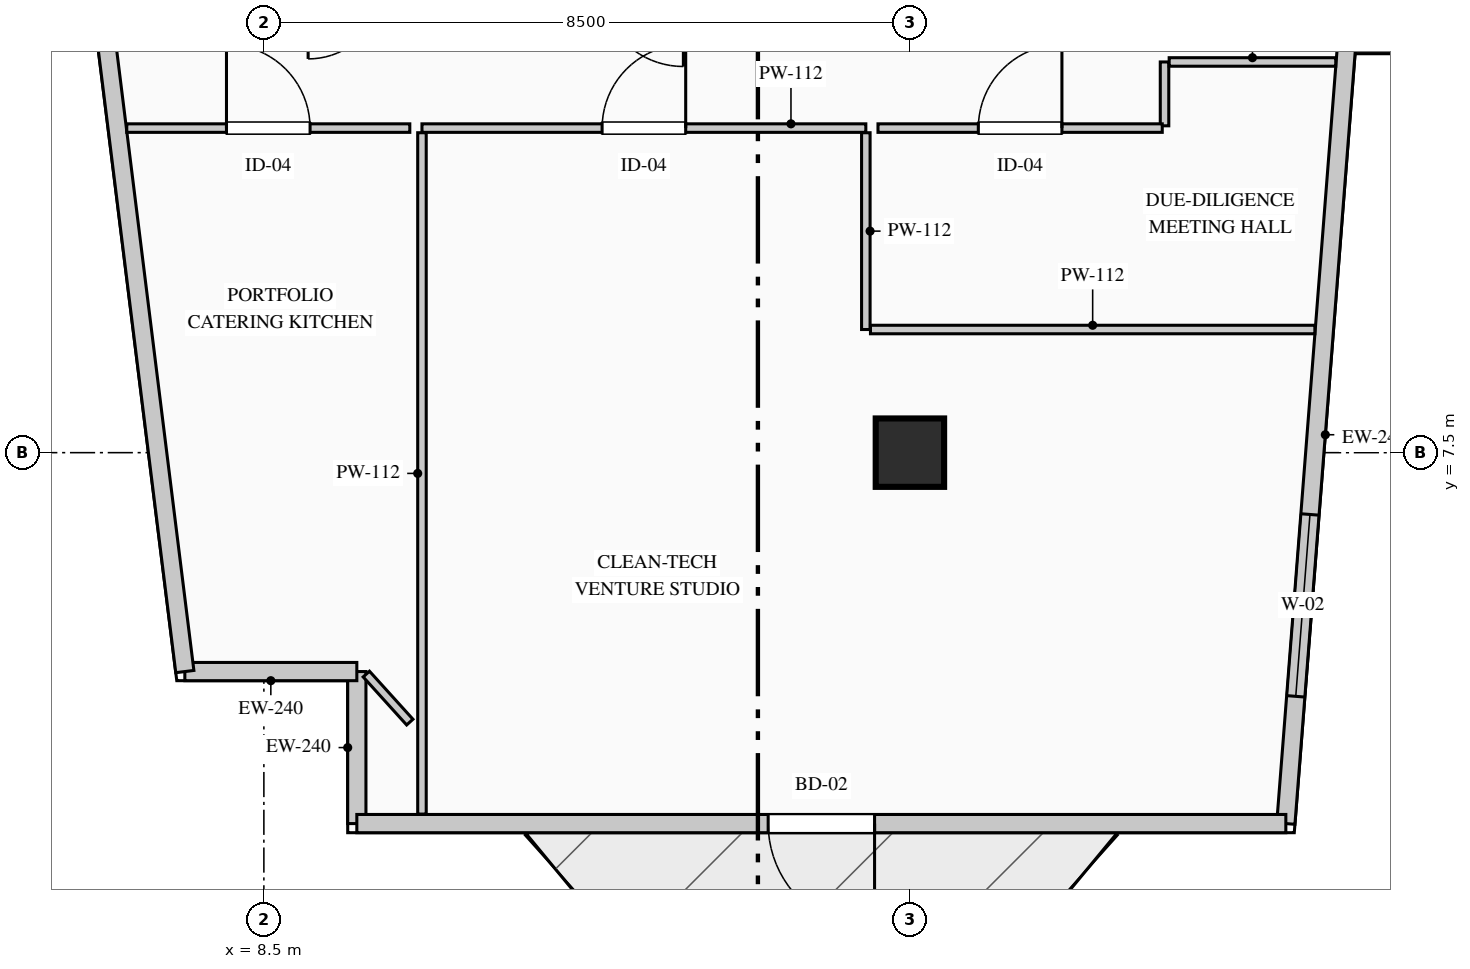
"""IFC4 building model, lengths in metres.
Left out: names, types, materials, properties, quantities, classifications, styles, units other than length and angle.
Written with IfcOpenShell. Run it as: python <this file> out.ifc"""

import sys

from ifc_helpers import new_model, si_unit, direction, frame, frame_2d, origin, origin_2d, place, context, subcontext, project, spatial, rectangle, extrude, element, fill, save


model = new_model("IFC4")
c1 = context("Model", 3, precision=1e-05, world=origin(), true_north=direction((0.0, 1.0)))
c2 = subcontext(c1, "Body", "Model", "MODEL_VIEW")
j1 = project(units=[si_unit("LENGTHUNIT", "METRE"), si_unit("PLANEANGLEUNIT", "RADIAN")], contexts=[c1])
p1 = place(None, origin())
s1 = spatial("IfcSite", under=j1, at=p1, CompositionType="ELEMENT")
p2 = place(p1, origin())
s2 = spatial("IfcBuilding", under=s1, at=p2, CompositionType="ELEMENT")
p3 = place(p2, frame((0.0, 0.0, 227.2)))
s3 = spatial("IfcBuildingStorey", under=s2, at=p3, CompositionType="ELEMENT", Elevation=227.2)
p4 = place(p3, frame((17.0, 7.5, 0.0), z_axis=(0.0, 0.0, 1.0), x_axis=(1.0, 0.0, 0.0)))
e1 = element("IfcColumn", 1, at=p4, inside=s3, PredefinedType="COLUMN", context=c2, shape_type="SweptSolid", body=[
    extrude(rectangle(XDim=0.9, YDim=0.9, at=origin_2d()), origin(), (0.0, 0.0, 1.0), 3.95),
])
p5 = place(p3, frame((9.723, 2.62, 0.0), z_axis=(0.0, 0.0, 1.0), x_axis=(0.0, 1.0, 0.0)))
e2 = element("IfcWall", 2, at=p5, inside=s3, PredefinedType="STANDARD", context=c2, shape_type="SweptSolid", body=[
    extrude(rectangle(XDim=2.0, YDim=0.24, at=frame_2d((1.0, 0.0))), origin(), (0.0, 0.0, 1.0), 3.7),
])
p6 = place(p3, frame((9.723, 4.62, 0.0), z_axis=(0.0, 0.0, 1.0), x_axis=(-1.0, 0.0, 0.0)))
e3 = element("IfcWall", 3, at=p6, inside=s3, PredefinedType="STANDARD", context=c2, shape_type="SweptSolid", body=[
    extrude(rectangle(XDim=2.263, YDim=0.24, at=frame_2d((1.131, 0.0))), origin(), (0.0, 0.0, 1.0), 3.7),
])
p7 = place(p3, frame((7.46, 4.62, 0.0), z_axis=(0.0, 0.0, 1.0), x_axis=(-0.123515576323, 0.992342633573, 0.0)))
e4 = element("IfcWall", 4, at=p7, inside=s3, PredefinedType="STANDARD", context=c2, shape_type="SweptSolid", body=[
    extrude(rectangle(XDim=37.043, YDim=0.24, at=frame_2d((18.522, 0.0))), origin(), (0.0, 0.0, 1.0), 3.7),
])
p8 = place(p7, frame((9.536, 0.0, 0.9)))
e5 = element("IfcOpeningElement", 5, at=p8, cuts=e4, PredefinedType="OPENING", context=c2, shape_type="SweptSolid", body=[
    extrude(rectangle(XDim=2.7, YDim=2.1, at=frame_2d((1.35, 1.05))), frame((0.0, 0.13, 0.0), z_axis=(0.0, -1.0, 0.0), x_axis=(1.0, 0.0, 0.0)), (0.0, 0.0, 1.0), 0.26),
])
p9 = place(p3, frame((29.581, 12.87, 0.0), z_axis=(0.0, 0.0, 1.0), x_axis=(-1.0, 0.0, 0.0)))
e6 = element("IfcWall", 6, at=p9, inside=s3, PredefinedType="STANDARD", context=c2, shape_type="SweptSolid", body=[
    extrude(rectangle(XDim=6.834, YDim=0.24, at=frame_2d((3.417, 0.0))), origin(), (0.0, 0.0, 1.0), 3.7),
])
p10 = place(p9, frame((1.26, 0.0, 0.9)))
e7 = element("IfcOpeningElement", 7, at=p10, cuts=e6, PredefinedType="OPENING", context=c2, shape_type="SweptSolid", body=[
    extrude(rectangle(XDim=2.4, YDim=2.1, at=frame_2d((1.2, 1.05))), frame((0.0, 0.13, 0.0), z_axis=(0.0, -1.0, 0.0), x_axis=(1.0, 0.0, 0.0)), (0.0, 0.0, 1.0), 0.26),
])
p11 = place(p3, frame((22.746, 12.87, 0.0), z_axis=(0.0, 0.0, 1.0), x_axis=(-0.077816860153, -0.996967670627, 0.0)))
e8 = element("IfcWall", 8, at=p11, inside=s3, PredefinedType="STANDARD", context=c2, shape_type="SweptSolid", body=[
    extrude(rectangle(XDim=10.281, YDim=0.24, at=frame_2d((5.141, 0.0))), origin(), (0.0, 0.0, 1.0), 3.7),
])
p12 = place(p11, frame((6.202, 0.0, 0.9)))
e9 = element("IfcOpeningElement", 9, at=p12, cuts=e8, PredefinedType="OPENING", context=c2, shape_type="SweptSolid", body=[
    extrude(rectangle(XDim=2.4, YDim=2.1, at=frame_2d((1.2, 1.05))), frame((0.0, 0.13, 0.0), z_axis=(0.0, -1.0, 0.0), x_axis=(1.0, 0.0, 0.0)), (0.0, 0.0, 1.0), 0.26),
])
p13 = place(p3, frame((21.946, 2.62, 0.0), z_axis=(0.0, 0.0, 1.0), x_axis=(-1.0, 0.0, 0.0)))
e10 = element("IfcWall", 10, at=p13, inside=s3, PredefinedType="STANDARD", context=c2, shape_type="SweptSolid", body=[
    extrude(rectangle(XDim=12.223, YDim=0.24, at=frame_2d((6.112, 0.0))), origin(), (0.0, 0.0, 1.0), 3.7),
])
p14 = place(p13, frame((5.411, 0.0, 0.0)))
e11 = element("IfcOpeningElement", 11, at=p14, cuts=e10, PredefinedType="OPENING", context=c2, shape_type="SweptSolid", body=[
    extrude(rectangle(XDim=1.4, YDim=2.2, at=frame_2d((0.7, 1.1))), frame((0.0, 0.13, 0.0), z_axis=(0.0, -1.0, 0.0), x_axis=(1.0, 0.0, 0.0)), (0.0, 0.0, 1.0), 0.26),
])
p15 = place(p3, frame((10.58, 11.77, 0.0), z_axis=(0.0, 0.0, 1.0), x_axis=(1.0, 0.0, 0.0)))
e12 = element("IfcWall", 12, at=p15, inside=s3, PredefinedType="PARTITIONING", context=c2, shape_type="SweptSolid", body=[
    extrude(rectangle(XDim=5.84, YDim=0.112, at=frame_2d((2.92, 0.0))), origin(), (0.0, 0.0, 1.0), 3.7),
])
p16 = place(p15, frame((2.37, 0.0, 0.0)))
e13 = element("IfcOpeningElement", 13, at=p16, cuts=e12, PredefinedType="OPENING", context=c2, shape_type="SweptSolid", body=[
    extrude(rectangle(XDim=1.1, YDim=2.2, at=frame_2d((0.55, 1.1))), frame((0.0, 0.066, 0.0), z_axis=(0.0, -1.0, 0.0), x_axis=(1.0, 0.0, 0.0)), (0.0, 0.0, 1.0), 0.132),
])
p17 = place(p3, frame((16.42, 11.709, 0.0), z_axis=(0.0, 0.0, 1.0), x_axis=(0.0, -1.0, 0.0)))
e14 = element("IfcWall", 14, at=p17, inside=s3, PredefinedType="PARTITIONING", context=c2, shape_type="SweptSolid", body=[
    extrude(rectangle(XDim=2.589, YDim=0.112, at=frame_2d((1.294, 0.0))), origin(), (0.0, 0.0, 1.0), 3.7),
])
p18 = place(p3, frame((16.481, 9.12, 0.0), z_axis=(0.0, 0.0, 1.0), x_axis=(1.0, 0.0, 0.0)))
e15 = element("IfcWall", 15, at=p18, inside=s3, PredefinedType="PARTITIONING", context=c2, shape_type="SweptSolid", body=[
    extrude(rectangle(XDim=5.847, YDim=0.112, at=frame_2d((2.923, 0.0))), origin(), (0.0, 0.0, 1.0), 3.7),
])
p19 = place(p3, frame((10.58, 2.745, 0.0), z_axis=(0.0, 0.0, 1.0), x_axis=(0.0, 1.0, 0.0)))
e16 = element("IfcWall", 16, at=p19, inside=s3, PredefinedType="PARTITIONING", context=c2, shape_type="SweptSolid", body=[
    extrude(rectangle(XDim=8.964, YDim=0.112, at=frame_2d((4.482, 0.0))), origin(), (0.0, 0.0, 1.0), 3.7),
])
p20 = place(p3, frame((10.42, 3.955, 0.0), z_axis=(0.0, 0.0, 1.0), x_axis=(-0.671145806114, 0.741325371841, 0.0)))
e17 = element("IfcWall", 17, at=p20, inside=s3, PredefinedType="PARTITIONING", context=c2, shape_type="SweptSolid", body=[
    extrude(rectangle(XDim=0.852, YDim=0.112, at=frame_2d((0.426, 0.0))), origin(), (0.0, 0.0, 1.0), 3.7),
])
p21 = place(p3, frame((6.696, 11.77, 0.0), z_axis=(0.0, 0.0, 1.0), x_axis=(1.0, 0.0, 0.0)))
e18 = element("IfcWall", 18, at=p21, inside=s3, PredefinedType="PARTITIONING", context=c2, shape_type="SweptSolid", body=[
    extrude(rectangle(XDim=3.724, YDim=0.112, at=frame_2d((1.862, 0.0))), origin(), (0.0, 0.0, 1.0), 3.7),
])
p22 = place(p21, frame((1.312, 0.0, 0.0)))
e19 = element("IfcOpeningElement", 19, at=p22, cuts=e18, PredefinedType="OPENING", context=c2, shape_type="SweptSolid", body=[
    extrude(rectangle(XDim=1.1, YDim=2.2, at=frame_2d((0.55, 1.1))), frame((0.0, 0.066, 0.0), z_axis=(0.0, -1.0, 0.0), x_axis=(1.0, 0.0, 0.0)), (0.0, 0.0, 1.0), 0.132),
])
p23 = place(p3, frame((20.35, 11.8, 0.0), z_axis=(0.0, 0.0, 1.0), x_axis=(0.0, 1.0, 0.0)))
e20 = element("IfcWall", 20, at=p23, inside=s3, PredefinedType="PARTITIONING", context=c2, shape_type="SweptSolid", body=[
    extrude(rectangle(XDim=0.84, YDim=0.112, at=frame_2d((0.42, 0.0))), origin(), (0.0, 0.0, 1.0), 3.7),
])
p24 = place(p3, frame((20.411, 12.64, 0.0), z_axis=(0.0, 0.0, 1.0), x_axis=(1.0, 0.0, 0.0)))
e21 = element("IfcWall", 21, at=p24, inside=s3, PredefinedType="PARTITIONING", context=c2, shape_type="SweptSolid", body=[
    extrude(rectangle(XDim=2.192, YDim=0.112, at=frame_2d((1.096, 0.0))), origin(), (0.0, 0.0, 1.0), 3.7),
])
p25 = place(p3, frame((16.58, 11.77, 0.0), z_axis=(0.0, 0.0, 1.0), x_axis=(1.0, 0.0, 0.0)))
e22 = element("IfcWall", 22, at=p25, inside=s3, PredefinedType="PARTITIONING", context=c2, shape_type="SweptSolid", body=[
    extrude(rectangle(XDim=3.74, YDim=0.112, at=frame_2d((1.87, 0.0))), origin(), (0.0, 0.0, 1.0), 3.7),
])
p26 = place(p25, frame((1.32, 0.0, 0.0)))
e23 = element("IfcOpeningElement", 23, at=p26, cuts=e22, PredefinedType="OPENING", context=c2, shape_type="SweptSolid", body=[
    extrude(rectangle(XDim=1.1, YDim=2.2, at=frame_2d((0.55, 1.1))), frame((0.0, 0.066, 0.0), z_axis=(0.0, -1.0, 0.0), x_axis=(1.0, 0.0, 0.0)), (0.0, 0.0, 1.0), 0.132),
])
p27 = place(p12, origin())
e24 = element("IfcWindow", 24, at=p27, inside=s3, PartitioningType="DOUBLE_PANEL_VERTICAL", PredefinedType="WINDOW", context=c2, shape_type="SweptSolid", body=[
    extrude(rectangle(XDim=2.4, YDim=2.1, at=frame_2d((1.2, 1.05))), frame((0.0, 0.03, 0.0), z_axis=(0.0, -1.0, 0.0), x_axis=(1.0, 0.0, 0.0)), (0.0, 0.0, 1.0), 0.06),
])
fill(e9, e24)
p28 = place(p14, origin())
e25 = element("IfcDoor", 25, at=p28, inside=s3, OperationType="SINGLE_SWING_LEFT", PredefinedType="DOOR", context=c2, shape_type="SweptSolid", body=[
    extrude(rectangle(XDim=1.4, YDim=2.2, at=frame_2d((0.7, 1.1))), frame((0.0, 0.025, 0.0), z_axis=(0.0, -1.0, 0.0), x_axis=(1.0, 0.0, 0.0)), (0.0, 0.0, 1.0), 0.05),
])
fill(e11, e25)
p29 = place(p16, origin())
e26 = element("IfcDoor", 26, at=p29, inside=s3, OperationType="SINGLE_SWING_RIGHT", PredefinedType="DOOR", context=c2, shape_type="SweptSolid", body=[
    extrude(rectangle(XDim=1.1, YDim=2.2, at=frame_2d((0.55, 1.1))), frame((0.0, 0.025, 0.0), z_axis=(0.0, -1.0, 0.0), x_axis=(1.0, 0.0, 0.0)), (0.0, 0.0, 1.0), 0.05),
])
fill(e13, e26)
p30 = place(p22, origin())
e27 = element("IfcDoor", 27, at=p30, inside=s3, OperationType="SINGLE_SWING_LEFT", PredefinedType="DOOR", context=c2, shape_type="SweptSolid", body=[
    extrude(rectangle(XDim=1.1, YDim=2.2, at=frame_2d((0.55, 1.1))), frame((0.0, 0.025, 0.0), z_axis=(0.0, -1.0, 0.0), x_axis=(1.0, 0.0, 0.0)), (0.0, 0.0, 1.0), 0.05),
])
fill(e19, e27)
p31 = place(p26, origin())
e28 = element("IfcDoor", 28, at=p31, inside=s3, OperationType="SINGLE_SWING_RIGHT", PredefinedType="DOOR", context=c2, shape_type="SweptSolid", body=[
    extrude(rectangle(XDim=1.1, YDim=2.2, at=frame_2d((0.55, 1.1))), frame((0.0, 0.025, 0.0), z_axis=(0.0, -1.0, 0.0), x_axis=(1.0, 0.0, 0.0)), (0.0, 0.0, 1.0), 0.05),
])
fill(e23, e28)
save(model, sys.argv[1])
